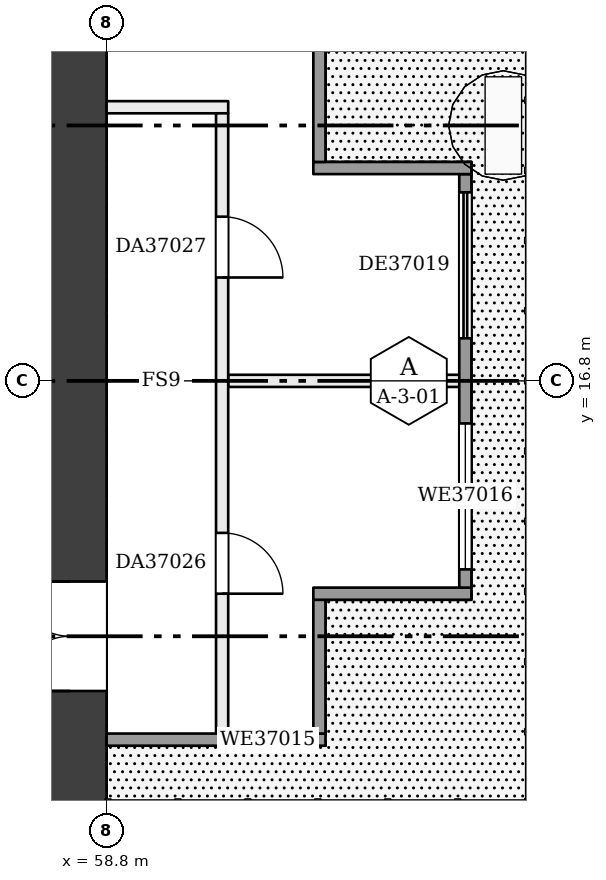
"""IFC4 building model, lengths in metres.
Left out: names, types, materials, properties, quantities, classifications, styles, units other than length and angle.
Written with IfcOpenShell. Run it as: python <this file> out.ifc"""

import sys

from ifc_helpers import new_model, si_unit, direction, frame, frame_2d, origin, place, context, subcontext, project, spatial, rectangle, extrude, element, fill, save


model = new_model("IFC4")
c1 = context("Model", 3, precision=1e-05, world=origin(), true_north=direction((0.0, 1.0)))
c2 = subcontext(c1, "Body", "Model", "MODEL_VIEW")
j1 = project(units=[si_unit("LENGTHUNIT", "METRE"), si_unit("PLANEANGLEUNIT", "RADIAN")], contexts=[c1])
p1 = place(None, origin())
s1 = spatial("IfcSite", under=j1, at=p1, CompositionType="ELEMENT")
p2 = place(p1, origin())
s2 = spatial("IfcBuilding", under=s1, at=p2, CompositionType="ELEMENT")
p3 = place(p2, frame((0.0, 0.0, 147.7)))
s3 = spatial("IfcBuildingStorey", under=s2, at=p3, CompositionType="ELEMENT", Elevation=147.7)
p4 = place(p3, frame((58.2, 9.6, 0.0), z_axis=(0.0, 0.0, 1.0), x_axis=(0.0, 1.0, 0.0)))
e1 = element("IfcWall", 1, at=p4, inside=s3, PredefinedType="SHEAR", context=c2, shape_type="SweptSolid", body=[
    extrude(rectangle(XDim=14.4, YDim=1.2, at=frame_2d((7.2, 0.0))), origin(), (0.0, 0.0, 1.0), 3.22),
])
p5 = place(p4, frame((2.1, 0.0, 0.0)))
e2 = element("IfcOpeningElement", 2, at=p5, cuts=e1, PredefinedType="OPENING", context=c2, shape_type="SweptSolid", body=[
    extrude(rectangle(XDim=1.8, YDim=2.1, at=frame_2d((0.9, 1.05))), frame((0.0, 0.61, 0.0), z_axis=(0.0, -1.0, 0.0), x_axis=(1.0, 0.0, 0.0)), (0.0, 0.0, 1.0), 1.22),
])
p6 = place(p3, frame((60.8, 16.8, 0.0), z_axis=(0.0, 0.0, 1.0), x_axis=(1.0, 0.0, 0.0)))
e3 = element("IfcWall", 3, at=p6, inside=s3, PredefinedType="PARTITIONING", context=c2, shape_type="SweptSolid", body=[
    extrude(rectangle(XDim=3.9, YDim=0.2, at=frame_2d((1.95, 0.0))), origin(), (0.0, 0.0, 1.0), 3.22),
])
p7 = place(p3, frame((58.8, 21.3, 0.0), z_axis=(0.0, 0.0, 1.0), x_axis=(1.0, 0.0, 0.0)))
e4 = element("IfcWall", 4, at=p7, inside=s3, PredefinedType="PARTITIONING", context=c2, shape_type="SweptSolid", body=[
    extrude(rectangle(XDim=2.0, YDim=0.2, at=frame_2d((1.0, 0.0))), origin(), (0.0, 0.0, 1.0), 3.22),
])
p8 = place(p3, frame((60.7, 10.9, 0.0), z_axis=(0.0, 0.0, 1.0), x_axis=(0.0, 1.0, 0.0)))
e5 = element("IfcWall", 5, at=p8, inside=s3, PredefinedType="PARTITIONING", context=c2, shape_type="SweptSolid", body=[
    extrude(rectangle(XDim=10.3, YDim=0.2, at=frame_2d((5.15, 0.0))), origin(), (0.0, 0.0, 1.0), 3.22),
])
p9 = place(p8, frame((2.4, 0.0, 0.0)))
e6 = element("IfcOpeningElement", 6, at=p9, cuts=e5, PredefinedType="OPENING", context=c2, shape_type="SweptSolid", body=[
    extrude(rectangle(XDim=1.0, YDim=2.1, at=frame_2d((0.5, 1.05))), frame((0.0, 0.11, 0.0), z_axis=(0.0, -1.0, 0.0), x_axis=(1.0, 0.0, 0.0)), (0.0, 0.0, 1.0), 0.22),
])
p10 = place(p8, frame((7.6, 0.0, 0.0)))
e7 = element("IfcOpeningElement", 7, at=p10, cuts=e5, PredefinedType="OPENING", context=c2, shape_type="SweptSolid", body=[
    extrude(rectangle(XDim=1.0, YDim=2.1, at=frame_2d((0.5, 1.05))), frame((0.0, 0.11, 0.0), z_axis=(0.0, -1.0, 0.0), x_axis=(1.0, 0.0, 0.0)), (0.0, 0.0, 1.0), 0.22),
])
p11 = place(p3, frame((58.8, 10.9, 0.0), z_axis=(0.0, 0.0, 1.0), x_axis=(1.0, 0.0, 0.0)))
e8 = element("IfcWall", 8, at=p11, inside=s3, PredefinedType="SOLIDWALL", context=c2, shape_type="SweptSolid", body=[
    extrude(rectangle(XDim=3.6, YDim=0.2, at=frame_2d((1.8, 0.0))), origin(), (0.0, 0.0, 1.0), 3.22),
])
p12 = place(p11, frame((2.0, 0.0, 0.9)))
e9 = element("IfcOpeningElement", 9, at=p12, cuts=e8, PredefinedType="OPENING", context=c2, shape_type="SweptSolid", body=[
    extrude(rectangle(XDim=1.3, YDim=1.5, at=frame_2d((0.65, 0.75))), frame((0.0, 0.11, 0.0), z_axis=(0.0, -1.0, 0.0), x_axis=(1.0, 0.0, 0.0)), (0.0, 0.0, 1.0), 0.22),
])
p13 = place(p3, frame((62.3, 11.0, 0.0), z_axis=(0.0, 0.0, 1.0), x_axis=(0.0, 1.0, 0.0)))
e10 = element("IfcWall", 10, at=p13, inside=s3, PredefinedType="SOLIDWALL", context=c2, shape_type="SweptSolid", body=[
    extrude(rectangle(XDim=2.2, YDim=0.2, at=frame_2d((1.1, 0.0))), origin(), (0.0, 0.0, 1.0), 3.22),
])
p14 = place(p3, frame((62.2, 13.3, 0.0), z_axis=(0.0, 0.0, 1.0), x_axis=(1.0, 0.0, 0.0)))
e11 = element("IfcWall", 11, at=p14, inside=s3, PredefinedType="SOLIDWALL", context=c2, shape_type="SweptSolid", body=[
    extrude(rectangle(XDim=2.6, YDim=0.2, at=frame_2d((1.3, 0.0))), origin(), (0.0, 0.0, 1.0), 3.22),
])
p15 = place(p3, frame((64.7, 13.4, 0.0), z_axis=(0.0, 0.0, 1.0), x_axis=(0.0, 1.0, 0.0)))
e12 = element("IfcWall", 12, at=p15, inside=s3, PredefinedType="SOLIDWALL", context=c2, shape_type="SweptSolid", body=[
    extrude(rectangle(XDim=6.8, YDim=0.2, at=frame_2d((3.4, 0.0))), origin(), (0.0, 0.0, 1.0), 3.22),
])
p16 = place(p15, frame((0.3, 0.0, 0.9)))
e13 = element("IfcOpeningElement", 13, at=p16, cuts=e12, PredefinedType="OPENING", context=c2, shape_type="SweptSolid", body=[
    extrude(rectangle(XDim=2.4, YDim=1.5, at=frame_2d((1.2, 0.75))), frame((0.0, 0.11, 0.0), z_axis=(0.0, -1.0, 0.0), x_axis=(1.0, 0.0, 0.0)), (0.0, 0.0, 1.0), 0.22),
])
p17 = place(p15, frame((4.1, 0.0, 0.0)))
e14 = element("IfcOpeningElement", 14, at=p17, cuts=e12, PredefinedType="OPENING", context=c2, shape_type="SweptSolid", body=[
    extrude(rectangle(XDim=2.4, YDim=2.2, at=frame_2d((1.2, 1.1))), frame((0.0, 0.11, 0.0), z_axis=(0.0, -1.0, 0.0), x_axis=(1.0, 0.0, 0.0)), (0.0, 0.0, 1.0), 0.22),
])
p18 = place(p3, frame((64.8, 20.3, 0.0), z_axis=(0.0, 0.0, 1.0), x_axis=(-1.0, 0.0, 0.0)))
e15 = element("IfcWall", 15, at=p18, inside=s3, PredefinedType="SOLIDWALL", context=c2, shape_type="SweptSolid", body=[
    extrude(rectangle(XDim=2.6, YDim=0.2, at=frame_2d((1.3, 0.0))), origin(), (0.0, 0.0, 1.0), 3.22),
])
p19 = place(p3, frame((62.3, 20.4, 0.0), z_axis=(0.0, 0.0, 1.0), x_axis=(0.0, 1.0, 0.0)))
e16 = element("IfcWall", 16, at=p19, inside=s3, PredefinedType="SOLIDWALL", context=c2, shape_type="SweptSolid", body=[
    extrude(rectangle(XDim=2.2, YDim=0.2, at=frame_2d((1.1, 0.0))), origin(), (0.0, 0.0, 1.0), 3.22),
])
p20 = place(p5, origin())
e17 = element("IfcDoor", 17, at=p20, inside=s3, OperationType="DOUBLE_DOOR_SINGLE_SWING", PredefinedType="DOOR", context=c2, shape_type="SweptSolid", body=[
    extrude(rectangle(XDim=1.8, YDim=2.1, at=frame_2d((0.9, 1.05))), frame((0.0, 0.025, 0.0), z_axis=(0.0, -1.0, 0.0), x_axis=(1.0, 0.0, 0.0)), (0.0, 0.0, 1.0), 0.05),
])
fill(e2, e17)
p21 = place(p9, frame((1.0, 0.0, 0.0), z_axis=(0.0, 0.0, 1.0), x_axis=(-1.0, 0.0, 0.0)))
e18 = element("IfcDoor", 18, at=p21, inside=s3, OperationType="SINGLE_SWING_RIGHT", PredefinedType="DOOR", context=c2, shape_type="SweptSolid", body=[
    extrude(rectangle(XDim=1.0, YDim=2.1, at=frame_2d((0.5, 1.05))), frame((0.0, 0.025, 0.0), z_axis=(0.0, -1.0, 0.0), x_axis=(1.0, 0.0, 0.0)), (0.0, 0.0, 1.0), 0.05),
])
fill(e6, e18)
p22 = place(p10, frame((1.0, 0.0, 0.0), z_axis=(0.0, 0.0, 1.0), x_axis=(-1.0, 0.0, 0.0)))
e19 = element("IfcDoor", 19, at=p22, inside=s3, OperationType="SINGLE_SWING_RIGHT", PredefinedType="DOOR", context=c2, shape_type="SweptSolid", body=[
    extrude(rectangle(XDim=1.0, YDim=2.1, at=frame_2d((0.5, 1.05))), frame((0.0, 0.025, 0.0), z_axis=(0.0, -1.0, 0.0), x_axis=(1.0, 0.0, 0.0)), (0.0, 0.0, 1.0), 0.05),
])
fill(e7, e19)
p23 = place(p12, origin())
e20 = element("IfcWindow", 20, at=p23, inside=s3, PartitioningType="SINGLE_PANEL", PredefinedType="WINDOW", context=c2, shape_type="SweptSolid", body=[
    extrude(rectangle(XDim=1.3, YDim=1.5, at=frame_2d((0.65, 0.75))), frame((0.0, 0.03, 0.0), z_axis=(0.0, -1.0, 0.0), x_axis=(1.0, 0.0, 0.0)), (0.0, 0.0, 1.0), 0.06),
])
fill(e9, e20)
p24 = place(p16, origin())
e21 = element("IfcWindow", 21, at=p24, inside=s3, PartitioningType="SINGLE_PANEL", PredefinedType="WINDOW", context=c2, shape_type="SweptSolid", body=[
    extrude(rectangle(XDim=2.4, YDim=1.5, at=frame_2d((1.2, 0.75))), frame((0.0, 0.03, 0.0), z_axis=(0.0, -1.0, 0.0), x_axis=(1.0, 0.0, 0.0)), (0.0, 0.0, 1.0), 0.06),
])
fill(e13, e21)
p25 = place(p17, origin())
e22 = element("IfcDoor", 22, at=p25, inside=s3, OperationType="DOUBLE_DOOR_SLIDING", PredefinedType="DOOR", context=c2, shape_type="SweptSolid", body=[
    extrude(rectangle(XDim=2.4, YDim=2.2, at=frame_2d((1.2, 1.1))), frame((0.0, 0.025, 0.0), z_axis=(0.0, -1.0, 0.0), x_axis=(1.0, 0.0, 0.0)), (0.0, 0.0, 1.0), 0.05),
])
fill(e14, e22)
save(model, sys.argv[1])
